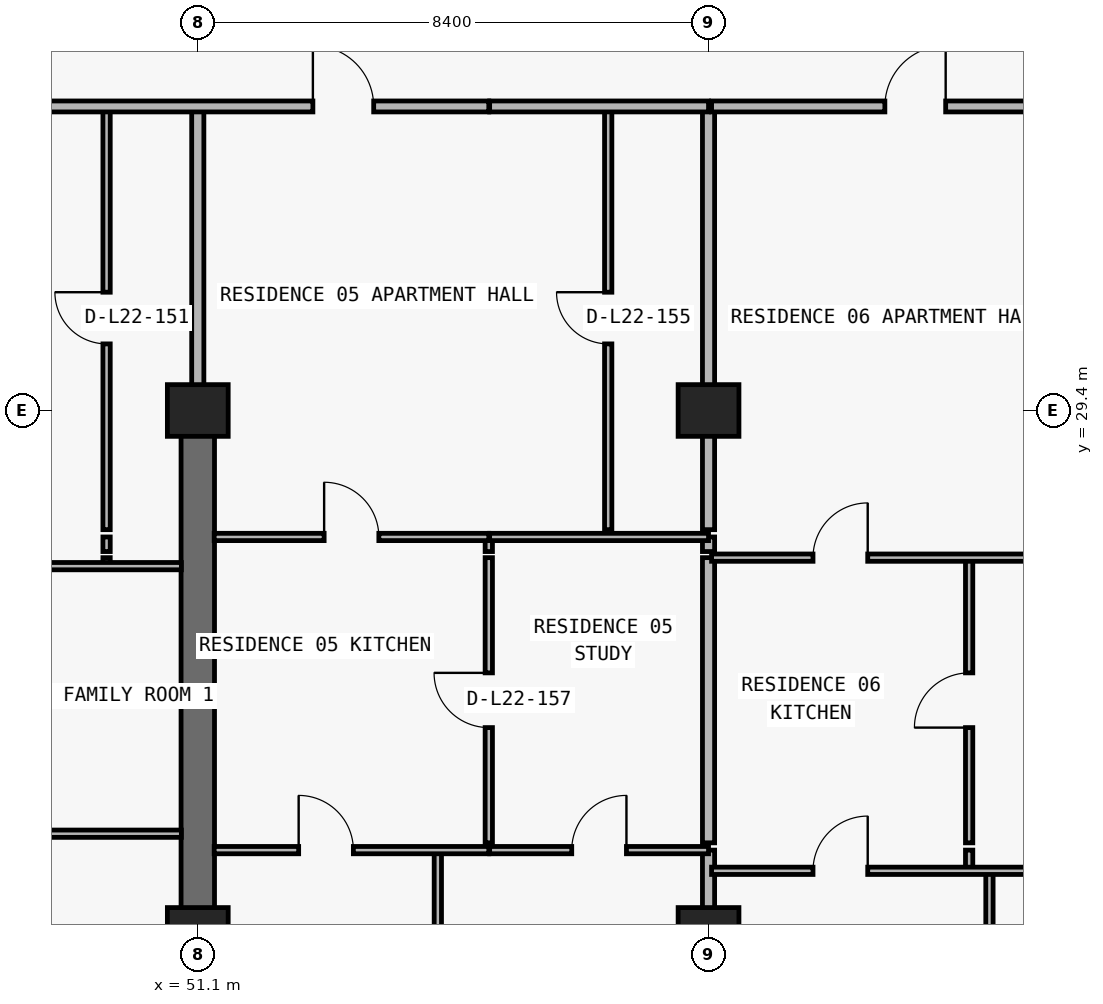
"""IFC4 building model, lengths in metres.
Left out: names, types, materials, properties, quantities, classifications, styles, units other than length and angle.
Written with IfcOpenShell. Run it as: python <this file> out.ifc"""

import sys

from ifc_helpers import new_model, si_unit, direction, frame, frame_2d, origin, origin_2d, place, context, subcontext, project, spatial, rectangle, extrude, element, fill, save


model = new_model("IFC4")
c1 = context("Model", 3, precision=1e-05, world=origin(), true_north=direction((0.0, 1.0)))
c2 = subcontext(c1, "Body", "Model", "MODEL_VIEW")
j1 = project(units=[si_unit("LENGTHUNIT", "METRE"), si_unit("PLANEANGLEUNIT", "RADIAN")], contexts=[c1])
p1 = place(None, origin())
s1 = spatial("IfcSite", under=j1, at=p1, CompositionType="ELEMENT")
p2 = place(p1, origin())
s2 = spatial("IfcBuilding", under=s1, at=p2, CompositionType="ELEMENT")
p3 = place(p2, frame((0.0, 0.0, 84.6)))
s3 = spatial("IfcBuildingStorey", under=s2, at=p3, CompositionType="ELEMENT", Elevation=84.6)
for number, where, z_axis, x_axis in (
    (1, (51.1, 20.8, 0.0), (0.0, 0.0, 1.0), (1.0, 0.0, 0.0)),
    (2, (59.5, 20.8, 0.0), (0.0, 0.0, 1.0), (1.0, 0.0, 0.0)),
    (3, (51.1, 29.4, 0.0), (0.0, 0.0, 1.0), (1.0, 0.0, 0.0)),
    (4, (59.5, 29.4, 0.0), (0.0, 0.0, 1.0), (1.0, 0.0, 0.0)),
):
    element("IfcColumn", number, at=place(p3, frame(where, z_axis=z_axis, x_axis=x_axis)), inside=s3, PredefinedType="COLUMN", context=c2, shape_type="SweptSolid", body=[
        extrude(rectangle(XDim=1.0, YDim=0.85, at=origin_2d()), origin(), (0.0, 0.0, 1.0), 3.05),
    ])
p4 = place(p3, frame((51.1, 20.8, 0.0), z_axis=(0.0, 0.0, 1.0), x_axis=(0.0, 1.0, 0.0)))
e5 = element("IfcWall", 5, at=p4, inside=s3, PredefinedType="SHEAR", context=c2, shape_type="SweptSolid", body=[
    extrude(rectangle(XDim=8.6, YDim=0.55, at=frame_2d((4.3, 0.0))), origin(), (0.0, 0.0, 1.0), 3.05),
])
p5 = place(p3, frame((49.6, 26.84, 0.0), z_axis=(0.0, 0.0, 1.0), x_axis=(0.0, 1.0, 0.0)))
e6 = element("IfcWall", 6, at=p5, inside=s3, PredefinedType="PARTITIONING", context=c2, shape_type="SweptSolid", body=[
    extrude(rectangle(XDim=0.14, YDim=0.12, at=frame_2d((0.07, 0.0))), origin(), (0.0, 0.0, 1.0), 3.05),
])
p6 = place(p3, frame((49.6, 27.08, 0.0), z_axis=(0.0, 0.0, 1.0), x_axis=(0.0, 1.0, 0.0)))
e7 = element("IfcWall", 7, at=p6, inside=s3, PredefinedType="PARTITIONING", context=c2, shape_type="SweptSolid", body=[
    extrude(rectangle(XDim=0.24, YDim=0.12, at=frame_2d((0.12, 0.0))), origin(), (0.0, 0.0, 1.0), 3.05),
])
p7 = place(p3, frame((49.6, 27.44, 0.0), z_axis=(0.0, 0.0, 1.0), x_axis=(0.0, 1.0, 0.0)))
e8 = element("IfcWall", 8, at=p7, inside=s3, PredefinedType="PARTITIONING", context=c2, shape_type="SweptSolid", body=[
    extrude(rectangle(XDim=6.96, YDim=0.12, at=frame_2d((3.48, 0.0))), origin(), (0.0, 0.0, 1.0), 3.05),
])
p8 = place(p7, frame((3.055, 0.0, 0.0)))
e9 = element("IfcOpeningElement", 9, at=p8, cuts=e8, PredefinedType="OPENING", context=c2, shape_type="SweptSolid", body=[
    extrude(rectangle(XDim=0.85, YDim=2.1, at=frame_2d((0.425, 1.05))), frame((0.0, 0.07, 0.0), z_axis=(0.0, -1.0, 0.0), x_axis=(1.0, 0.0, 0.0)), (0.0, 0.0, 1.0), 0.14),
])
p9 = place(p3, frame((51.1, 29.405, 0.0), z_axis=(0.0, 0.0, 1.0), x_axis=(0.0, 1.0, 0.0)))
e10 = element("IfcWall", 10, at=p9, inside=s3, PredefinedType="PARTITIONING", context=c2, shape_type="SweptSolid", body=[
    extrude(rectangle(XDim=4.995, YDim=0.2, at=frame_2d((2.498, 0.0))), origin(), (0.0, 0.0, 1.0), 2.335),
])
p10 = place(p3, frame((55.048, 8.84, 0.0), z_axis=(0.0, 0.0, 1.0), x_axis=(0.0, 1.0, 0.0)))
e11 = element("IfcWall", 11, at=p10, inside=s3, PredefinedType="PARTITIONING", context=c2, shape_type="SweptSolid", body=[
    extrude(rectangle(XDim=13.33, YDim=0.12, at=frame_2d((6.665, 0.0))), origin(), (0.0, 0.0, 1.0), 3.05),
])
p11 = place(p3, frame((55.886, 22.29, 0.0), z_axis=(0.0, 0.0, 1.0), x_axis=(0.0, 1.0, 0.0)))
e12 = element("IfcWall", 12, at=p11, inside=s3, PredefinedType="PARTITIONING", context=c2, shape_type="SweptSolid", body=[
    extrude(rectangle(XDim=4.69, YDim=0.12, at=frame_2d((2.345, 0.0))), origin(), (0.0, 0.0, 1.0), 3.05),
])
p12 = place(p11, frame((1.895, 0.0, 0.0)))
e13 = element("IfcOpeningElement", 13, at=p12, cuts=e12, PredefinedType="OPENING", context=c2, shape_type="SweptSolid", body=[
    extrude(rectangle(XDim=0.9, YDim=2.15, at=frame_2d((0.45, 1.075))), frame((0.0, 0.07, 0.0), z_axis=(0.0, -1.0, 0.0), x_axis=(1.0, 0.0, 0.0)), (0.0, 0.0, 1.0), 0.14),
])
p13 = place(p3, frame((55.886, 27.08, 0.0), z_axis=(0.0, 0.0, 1.0), x_axis=(0.0, 1.0, 0.0)))
e14 = element("IfcWall", 14, at=p13, inside=s3, PredefinedType="PARTITIONING", context=c2, shape_type="SweptSolid", body=[
    extrude(rectangle(XDim=0.24, YDim=0.12, at=frame_2d((0.12, 0.0))), origin(), (0.0, 0.0, 1.0), 3.05),
])
p14 = place(p3, frame((57.85, 27.44, 0.0), z_axis=(0.0, 0.0, 1.0), x_axis=(0.0, 1.0, 0.0)))
e15 = element("IfcWall", 15, at=p14, inside=s3, PredefinedType="PARTITIONING", context=c2, shape_type="SweptSolid", body=[
    extrude(rectangle(XDim=6.96, YDim=0.12, at=frame_2d((3.48, 0.0))), origin(), (0.0, 0.0, 1.0), 3.05),
])
p15 = place(p14, frame((3.055, 0.0, 0.0)))
e16 = element("IfcOpeningElement", 16, at=p15, cuts=e15, PredefinedType="OPENING", context=c2, shape_type="SweptSolid", body=[
    extrude(rectangle(XDim=0.85, YDim=2.1, at=frame_2d((0.425, 1.05))), frame((0.0, 0.07, 0.0), z_axis=(0.0, -1.0, 0.0), x_axis=(1.0, 0.0, 0.0)), (0.0, 0.0, 1.0), 0.14),
])
p16 = place(p3, frame((59.5, 8.84, 0.0), z_axis=(0.0, 0.0, 1.0), x_axis=(0.0, 1.0, 0.0)))
e17 = element("IfcWall", 17, at=p16, inside=s3, PredefinedType="PARTITIONING", context=c2, shape_type="SweptSolid", body=[
    extrude(rectangle(XDim=13.33, YDim=0.2, at=frame_2d((6.665, 0.0))), origin(), (0.0, 0.0, 1.0), 2.174),
])
p17 = place(p3, frame((59.5, 22.29, 0.0), z_axis=(0.0, 0.0, 1.0), x_axis=(0.0, 1.0, 0.0)))
e18 = element("IfcWall", 18, at=p17, inside=s3, PredefinedType="PARTITIONING", context=c2, shape_type="SweptSolid", body=[
    extrude(rectangle(XDim=4.69, YDim=0.2, at=frame_2d((2.345, 0.0))), origin(), (0.0, 0.0, 1.0), 2.174),
])
p18 = place(p3, frame((59.5, 27.08, 0.0), z_axis=(0.0, 0.0, 1.0), x_axis=(0.0, 1.0, 0.0)))
e19 = element("IfcWall", 19, at=p18, inside=s3, PredefinedType="PARTITIONING", context=c2, shape_type="SweptSolid", body=[
    extrude(rectangle(XDim=0.24, YDim=0.2, at=frame_2d((0.12, 0.0))), origin(), (0.0, 0.0, 1.0), 2.174),
])
p19 = place(p3, frame((59.5, 27.44, 0.0), z_axis=(0.0, 0.0, 1.0), x_axis=(0.0, 1.0, 0.0)))
e20 = element("IfcWall", 20, at=p19, inside=s3, PredefinedType="PARTITIONING", context=c2, shape_type="SweptSolid", body=[
    extrude(rectangle(XDim=6.96, YDim=0.2, at=frame_2d((3.48, 0.0))), origin(), (0.0, 0.0, 1.0), 2.174),
])
p20 = place(p3, frame((63.786, 21.83, 0.0), z_axis=(0.0, 0.0, 1.0), x_axis=(0.0, 1.0, 0.0)))
e21 = element("IfcWall", 21, at=p20, inside=s3, PredefinedType="PARTITIONING", context=c2, shape_type="SweptSolid", body=[
    extrude(rectangle(XDim=0.34, YDim=0.12, at=frame_2d((0.17, 0.0))), origin(), (0.0, 0.0, 1.0), 3.05),
])
p21 = place(p3, frame((63.786, 22.29, 0.0), z_axis=(0.0, 0.0, 1.0), x_axis=(0.0, 1.0, 0.0)))
e22 = element("IfcWall", 22, at=p21, inside=s3, PredefinedType="PARTITIONING", context=c2, shape_type="SweptSolid", body=[
    extrude(rectangle(XDim=4.69, YDim=0.12, at=frame_2d((2.345, 0.0))), origin(), (0.0, 0.0, 1.0), 3.05),
])
p22 = place(p21, frame((1.895, 0.0, 0.0)))
e23 = element("IfcOpeningElement", 23, at=p22, cuts=e22, PredefinedType="OPENING", context=c2, shape_type="SweptSolid", body=[
    extrude(rectangle(XDim=0.9, YDim=2.15, at=frame_2d((0.45, 1.075))), frame((0.0, 0.07, 0.0), z_axis=(0.0, -1.0, 0.0), x_axis=(1.0, 0.0, 0.0)), (0.0, 0.0, 1.0), 0.14),
])
p23 = place(p3, frame((64.12, 8.84, 0.0), z_axis=(0.0, 0.0, 1.0), x_axis=(0.0, 1.0, 0.0)))
e24 = element("IfcWall", 24, at=p23, inside=s3, PredefinedType="PARTITIONING", context=c2, shape_type="SweptSolid", body=[
    extrude(rectangle(XDim=12.99, YDim=0.12, at=frame_2d((6.495, 0.0))), origin(), (0.0, 0.0, 1.0), 3.05),
])
p24 = place(p3, frame((59.55, 21.83, 0.0), z_axis=(0.0, 0.0, 1.0), x_axis=(1.0, 0.0, 0.0)))
e25 = element("IfcWall", 25, at=p24, inside=s3, PredefinedType="PARTITIONING", context=c2, shape_type="SweptSolid", body=[
    extrude(rectangle(XDim=8.35, YDim=0.12, at=frame_2d((4.175, 0.0))), origin(), (0.0, 0.0, 1.0), 3.05),
])
p25 = place(p24, frame((1.668, 0.0, 0.0)))
e26 = element("IfcOpeningElement", 26, at=p25, cuts=e25, PredefinedType="OPENING", context=c2, shape_type="SweptSolid", body=[
    extrude(rectangle(XDim=0.9, YDim=2.15, at=frame_2d((0.45, 1.075))), frame((0.0, 0.07, 0.0), z_axis=(0.0, -1.0, 0.0), x_axis=(1.0, 0.0, 0.0)), (0.0, 0.0, 1.0), 0.14),
])
p26 = place(p24, frame((6.01, 0.0, 0.0)))
e27 = element("IfcOpeningElement", 27, at=p26, cuts=e25, PredefinedType="OPENING", context=c2, shape_type="SweptSolid", body=[
    extrude(rectangle(XDim=0.9, YDim=2.15, at=frame_2d((0.45, 1.075))), frame((0.0, 0.07, 0.0), z_axis=(0.0, -1.0, 0.0), x_axis=(1.0, 0.0, 0.0)), (0.0, 0.0, 1.0), 0.14),
])
p27 = place(p3, frame((51.37, 22.17, 0.0), z_axis=(0.0, 0.0, 1.0), x_axis=(1.0, 0.0, 0.0)))
e28 = element("IfcWall", 28, at=p27, inside=s3, PredefinedType="PARTITIONING", context=c2, shape_type="SweptSolid", body=[
    extrude(rectangle(XDim=4.516, YDim=0.12, at=frame_2d((2.258, 0.0))), origin(), (0.0, 0.0, 1.0), 3.05),
])
p28 = place(p27, frame((1.389, 0.0, 0.0)))
e29 = element("IfcOpeningElement", 29, at=p28, cuts=e28, PredefinedType="OPENING", context=c2, shape_type="SweptSolid", body=[
    extrude(rectangle(XDim=0.9, YDim=2.15, at=frame_2d((0.45, 1.075))), frame((0.0, 0.07, 0.0), z_axis=(0.0, -1.0, 0.0), x_axis=(1.0, 0.0, 0.0)), (0.0, 0.0, 1.0), 0.14),
])
p29 = place(p3, frame((55.9, 22.17, 0.0), z_axis=(0.0, 0.0, 1.0), x_axis=(1.0, 0.0, 0.0)))
e30 = element("IfcWall", 30, at=p29, inside=s3, PredefinedType="PARTITIONING", context=c2, shape_type="SweptSolid", body=[
    extrude(rectangle(XDim=3.6, YDim=0.12, at=frame_2d((1.8, 0.0))), origin(), (0.0, 0.0, 1.0), 3.05),
])
p30 = place(p29, frame((1.35, 0.0, 0.0)))
e31 = element("IfcOpeningElement", 31, at=p30, cuts=e30, PredefinedType="OPENING", context=c2, shape_type="SweptSolid", body=[
    extrude(rectangle(XDim=0.9, YDim=2.15, at=frame_2d((0.45, 1.075))), frame((0.0, 0.07, 0.0), z_axis=(0.0, -1.0, 0.0), x_axis=(1.0, 0.0, 0.0)), (0.0, 0.0, 1.0), 0.14),
])
p31 = place(p3, frame((42.7, 22.44, 0.0), z_axis=(0.0, 0.0, 1.0), x_axis=(1.0, 0.0, 0.0)))
e32 = element("IfcWall", 32, at=p31, inside=s3, PredefinedType="PARTITIONING", context=c2, shape_type="SweptSolid", body=[
    extrude(rectangle(XDim=8.13, YDim=0.12, at=frame_2d((4.065, 0.0))), origin(), (0.0, 0.0, 1.0), 3.05),
])
p32 = place(p31, frame((3.615, 0.0, 0.0)))
e33 = element("IfcOpeningElement", 33, at=p32, cuts=e32, PredefinedType="OPENING", context=c2, shape_type="SweptSolid", body=[
    extrude(rectangle(XDim=0.9, YDim=2.15, at=frame_2d((0.45, 1.075))), frame((0.0, 0.07, 0.0), z_axis=(0.0, -1.0, 0.0), x_axis=(1.0, 0.0, 0.0)), (0.0, 0.0, 1.0), 0.14),
])
p33 = place(p3, frame((42.7, 26.84, 0.0), z_axis=(0.0, 0.0, 1.0), x_axis=(1.0, 0.0, 0.0)))
e34 = element("IfcWall", 34, at=p33, inside=s3, PredefinedType="PARTITIONING", context=c2, shape_type="SweptSolid", body=[
    extrude(rectangle(XDim=8.13, YDim=0.12, at=frame_2d((4.065, 0.0))), origin(), (0.0, 0.0, 1.0), 3.05),
])
p34 = place(p33, frame((3.0, 0.0, 0.0)))
e35 = element("IfcOpeningElement", 35, at=p34, cuts=e34, PredefinedType="OPENING", context=c2, shape_type="SweptSolid", body=[
    extrude(rectangle(XDim=0.9, YDim=2.15, at=frame_2d((0.45, 1.075))), frame((0.0, 0.07, 0.0), z_axis=(0.0, -1.0, 0.0), x_axis=(1.0, 0.0, 0.0)), (0.0, 0.0, 1.0), 0.14),
])
p35 = place(p3, frame((59.55, 26.98, 0.0), z_axis=(0.0, 0.0, 1.0), x_axis=(1.0, 0.0, 0.0)))
e36 = element("IfcWall", 36, at=p35, inside=s3, PredefinedType="PARTITIONING", context=c2, shape_type="SweptSolid", body=[
    extrude(rectangle(XDim=8.35, YDim=0.12, at=frame_2d((4.175, 0.0))), origin(), (0.0, 0.0, 1.0), 3.05),
])
p36 = place(p35, frame((1.668, 0.0, 0.0)))
e37 = element("IfcOpeningElement", 37, at=p36, cuts=e36, PredefinedType="OPENING", context=c2, shape_type="SweptSolid", body=[
    extrude(rectangle(XDim=0.9, YDim=2.15, at=frame_2d((0.45, 1.075))), frame((0.0, 0.07, 0.0), z_axis=(0.0, -1.0, 0.0), x_axis=(1.0, 0.0, 0.0)), (0.0, 0.0, 1.0), 0.14),
])
p37 = place(p3, frame((51.37, 27.32, 0.0), z_axis=(0.0, 0.0, 1.0), x_axis=(1.0, 0.0, 0.0)))
e38 = element("IfcWall", 38, at=p37, inside=s3, PredefinedType="PARTITIONING", context=c2, shape_type="SweptSolid", body=[
    extrude(rectangle(XDim=4.516, YDim=0.12, at=frame_2d((2.258, 0.0))), origin(), (0.0, 0.0, 1.0), 3.05),
])
p38 = place(p37, frame((1.808, 0.0, 0.0)))
e39 = element("IfcOpeningElement", 39, at=p38, cuts=e38, PredefinedType="OPENING", context=c2, shape_type="SweptSolid", body=[
    extrude(rectangle(XDim=0.9, YDim=2.15, at=frame_2d((0.45, 1.075))), frame((0.0, 0.07, 0.0), z_axis=(0.0, -1.0, 0.0), x_axis=(1.0, 0.0, 0.0)), (0.0, 0.0, 1.0), 0.14),
])
p39 = place(p3, frame((55.9, 27.32, 0.0), z_axis=(0.0, 0.0, 1.0), x_axis=(1.0, 0.0, 0.0)))
e40 = element("IfcWall", 40, at=p39, inside=s3, PredefinedType="PARTITIONING", context=c2, shape_type="SweptSolid", body=[
    extrude(rectangle(XDim=3.6, YDim=0.12, at=frame_2d((1.8, 0.0))), origin(), (0.0, 0.0, 1.0), 3.05),
])
p40 = place(p3, frame((26.7, 34.4, 0.0), z_axis=(0.0, 0.0, 1.0), x_axis=(1.0, 0.0, 0.0)))
e41 = element("IfcWall", 41, at=p40, inside=s3, PredefinedType="PARTITIONING", context=c2, shape_type="SweptSolid", body=[
    extrude(rectangle(XDim=29.186, YDim=0.18, at=frame_2d((14.593, 0.0))), origin(), (0.0, 0.0, 1.0), 3.05),
])
p41 = place(p40, frame((2.875, 0.0, 0.0)))
e42 = element("IfcOpeningElement", 42, at=p41, cuts=e41, PredefinedType="OPENING", context=c2, shape_type="SweptSolid", body=[
    extrude(rectangle(XDim=1.0, YDim=2.2, at=frame_2d((0.5, 1.1))), frame((0.0, 0.1, 0.0), z_axis=(0.0, -1.0, 0.0), x_axis=(1.0, 0.0, 0.0)), (0.0, 0.0, 1.0), 0.2),
])
p42 = place(p40, frame((10.95, 0.0, 0.0)))
e43 = element("IfcOpeningElement", 43, at=p42, cuts=e41, PredefinedType="OPENING", context=c2, shape_type="SweptSolid", body=[
    extrude(rectangle(XDim=1.0, YDim=2.2, at=frame_2d((0.5, 1.1))), frame((0.0, 0.1, 0.0), z_axis=(0.0, -1.0, 0.0), x_axis=(1.0, 0.0, 0.0)), (0.0, 0.0, 1.0), 0.2),
])
p43 = place(p40, frame((26.293, 0.0, 0.0)))
e44 = element("IfcOpeningElement", 44, at=p43, cuts=e41, PredefinedType="OPENING", context=c2, shape_type="SweptSolid", body=[
    extrude(rectangle(XDim=1.0, YDim=2.2, at=frame_2d((0.5, 1.1))), frame((0.0, 0.1, 0.0), z_axis=(0.0, -1.0, 0.0), x_axis=(1.0, 0.0, 0.0)), (0.0, 0.0, 1.0), 0.2),
])
p44 = place(p3, frame((55.9, 34.4, 0.0), z_axis=(0.0, 0.0, 1.0), x_axis=(1.0, 0.0, 0.0)))
e45 = element("IfcWall", 45, at=p44, inside=s3, PredefinedType="PARTITIONING", context=c2, shape_type="SweptSolid", body=[
    extrude(rectangle(XDim=3.6, YDim=0.18, at=frame_2d((1.8, 0.0))), origin(), (0.0, 0.0, 1.0), 3.05),
])
p45 = place(p3, frame((59.55, 34.4, 0.0), z_axis=(0.0, 0.0, 1.0), x_axis=(1.0, 0.0, 0.0)))
e46 = element("IfcWall", 46, at=p45, inside=s3, PredefinedType="PARTITIONING", context=c2, shape_type="SweptSolid", body=[
    extrude(rectangle(XDim=10.55, YDim=0.18, at=frame_2d((5.275, 0.0))), origin(), (0.0, 0.0, 1.0), 3.05),
])
p46 = place(p45, frame((2.85, 0.0, 0.0)))
e47 = element("IfcOpeningElement", 47, at=p46, cuts=e46, PredefinedType="OPENING", context=c2, shape_type="SweptSolid", body=[
    extrude(rectangle(XDim=1.0, YDim=2.2, at=frame_2d((0.5, 1.1))), frame((0.0, 0.1, 0.0), z_axis=(0.0, -1.0, 0.0), x_axis=(1.0, 0.0, 0.0)), (0.0, 0.0, 1.0), 0.2),
])
p47 = place(p8, origin())
e48 = element("IfcDoor", 48, at=p47, inside=s3, OperationType="SINGLE_SWING_RIGHT", PredefinedType="DOOR", context=c2, shape_type="SweptSolid", body=[
    extrude(rectangle(XDim=0.85, YDim=2.1, at=frame_2d((0.425, 1.05))), frame((0.0, 0.025, 0.0), z_axis=(0.0, -1.0, 0.0), x_axis=(1.0, 0.0, 0.0)), (0.0, 0.0, 1.0), 0.05),
])
fill(e9, e48)
p48 = place(p43, origin())
e49 = element("IfcDoor", 49, at=p48, inside=s3, OperationType="SINGLE_SWING_LEFT", PredefinedType="DOOR", context=c2, shape_type="SweptSolid", body=[
    extrude(rectangle(XDim=1.0, YDim=2.2, at=frame_2d((0.5, 1.1))), frame((0.0, 0.025, 0.0), z_axis=(0.0, -1.0, 0.0), x_axis=(1.0, 0.0, 0.0)), (0.0, 0.0, 1.0), 0.05),
])
fill(e44, e49)
p49 = place(p15, origin())
e50 = element("IfcDoor", 50, at=p49, inside=s3, OperationType="SINGLE_SWING_RIGHT", PredefinedType="DOOR", context=c2, shape_type="SweptSolid", body=[
    extrude(rectangle(XDim=0.85, YDim=2.1, at=frame_2d((0.425, 1.05))), frame((0.0, 0.025, 0.0), z_axis=(0.0, -1.0, 0.0), x_axis=(1.0, 0.0, 0.0)), (0.0, 0.0, 1.0), 0.05),
])
fill(e16, e50)
p50 = place(p38, origin())
e51 = element("IfcDoor", 51, at=p50, inside=s3, OperationType="SINGLE_SWING_LEFT", PredefinedType="DOOR", context=c2, shape_type="SweptSolid", body=[
    extrude(rectangle(XDim=0.9, YDim=2.15, at=frame_2d((0.45, 1.075))), frame((0.0, 0.025, 0.0), z_axis=(0.0, -1.0, 0.0), x_axis=(1.0, 0.0, 0.0)), (0.0, 0.0, 1.0), 0.05),
])
fill(e39, e51)
p51 = place(p12, origin())
e52 = element("IfcDoor", 52, at=p51, inside=s3, OperationType="SINGLE_SWING_RIGHT", PredefinedType="DOOR", context=c2, shape_type="SweptSolid", body=[
    extrude(rectangle(XDim=0.9, YDim=2.15, at=frame_2d((0.45, 1.075))), frame((0.0, 0.025, 0.0), z_axis=(0.0, -1.0, 0.0), x_axis=(1.0, 0.0, 0.0)), (0.0, 0.0, 1.0), 0.05),
])
fill(e13, e52)
p52 = place(p28, origin())
e53 = element("IfcDoor", 53, at=p52, inside=s3, OperationType="SINGLE_SWING_LEFT", PredefinedType="DOOR", context=c2, shape_type="SweptSolid", body=[
    extrude(rectangle(XDim=0.9, YDim=2.15, at=frame_2d((0.45, 1.075))), frame((0.0, 0.025, 0.0), z_axis=(0.0, -1.0, 0.0), x_axis=(1.0, 0.0, 0.0)), (0.0, 0.0, 1.0), 0.05),
])
fill(e29, e53)
p53 = place(p30, origin())
e54 = element("IfcDoor", 54, at=p53, inside=s3, OperationType="SINGLE_SWING_RIGHT", PredefinedType="DOOR", context=c2, shape_type="SweptSolid", body=[
    extrude(rectangle(XDim=0.9, YDim=2.15, at=frame_2d((0.45, 1.075))), frame((0.0, 0.025, 0.0), z_axis=(0.0, -1.0, 0.0), x_axis=(1.0, 0.0, 0.0)), (0.0, 0.0, 1.0), 0.05),
])
fill(e31, e54)
p54 = place(p46, origin())
e55 = element("IfcDoor", 55, at=p54, inside=s3, OperationType="SINGLE_SWING_RIGHT", PredefinedType="DOOR", context=c2, shape_type="SweptSolid", body=[
    extrude(rectangle(XDim=1.0, YDim=2.2, at=frame_2d((0.5, 1.1))), frame((0.0, 0.025, 0.0), z_axis=(0.0, -1.0, 0.0), x_axis=(1.0, 0.0, 0.0)), (0.0, 0.0, 1.0), 0.05),
])
fill(e47, e55)
p55 = place(p36, origin())
e56 = element("IfcDoor", 56, at=p55, inside=s3, OperationType="SINGLE_SWING_RIGHT", PredefinedType="DOOR", context=c2, shape_type="SweptSolid", body=[
    extrude(rectangle(XDim=0.9, YDim=2.15, at=frame_2d((0.45, 1.075))), frame((0.0, 0.025, 0.0), z_axis=(0.0, -1.0, 0.0), x_axis=(1.0, 0.0, 0.0)), (0.0, 0.0, 1.0), 0.05),
])
fill(e37, e56)
p56 = place(p22, origin())
e57 = element("IfcDoor", 57, at=p56, inside=s3, OperationType="SINGLE_SWING_LEFT", PredefinedType="DOOR", context=c2, shape_type="SweptSolid", body=[
    extrude(rectangle(XDim=0.9, YDim=2.15, at=frame_2d((0.45, 1.075))), frame((0.0, 0.025, 0.0), z_axis=(0.0, -1.0, 0.0), x_axis=(1.0, 0.0, 0.0)), (0.0, 0.0, 1.0), 0.05),
])
fill(e23, e57)
p57 = place(p25, origin())
e58 = element("IfcDoor", 58, at=p57, inside=s3, OperationType="SINGLE_SWING_RIGHT", PredefinedType="DOOR", context=c2, shape_type="SweptSolid", body=[
    extrude(rectangle(XDim=0.9, YDim=2.15, at=frame_2d((0.45, 1.075))), frame((0.0, 0.025, 0.0), z_axis=(0.0, -1.0, 0.0), x_axis=(1.0, 0.0, 0.0)), (0.0, 0.0, 1.0), 0.05),
])
fill(e26, e58)
save(model, sys.argv[1])
